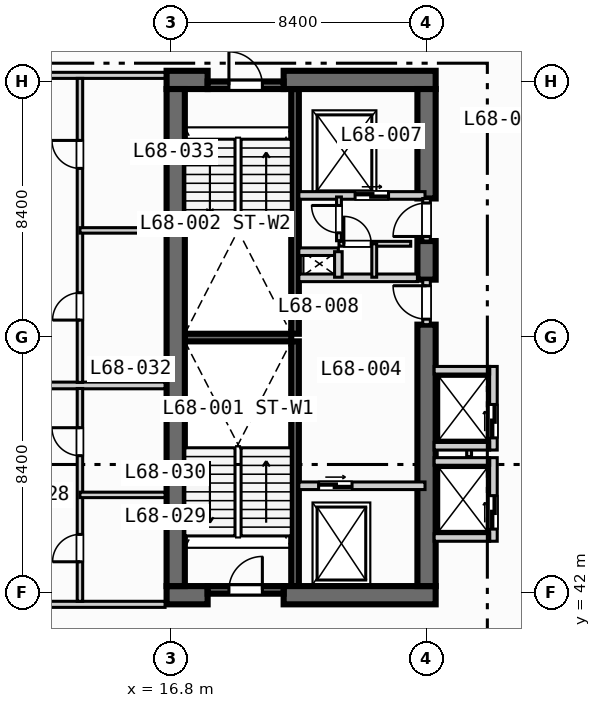
"""IFC4 building model, lengths in metres.
Left out: names, types, materials, properties, quantities, classifications, styles, units other than length and angle.
Written with IfcOpenShell. Run it as: python <this file> out.ifc"""

import sys

from ifc_helpers import new_model, si_unit, direction, frame, frame_2d, origin, place, context, subcontext, project, spatial, rectangle, extrude, element, fill, save


model = new_model("IFC4")
c1 = context("Model", 3, precision=1e-05, world=origin(), true_north=direction((0.0, 1.0)))
c2 = subcontext(c1, "Body", "Model", "MODEL_VIEW")
j1 = project(units=[si_unit("LENGTHUNIT", "METRE"), si_unit("PLANEANGLEUNIT", "RADIAN")], contexts=[c1])
p1 = place(None, origin())
s1 = spatial("IfcSite", under=j1, at=p1, CompositionType="ELEMENT")
p2 = place(p1, origin())
s2 = spatial("IfcBuilding", under=s1, at=p2, CompositionType="ELEMENT")
p3 = place(p2, frame((0.0, 0.0, 274.9)))
s3 = spatial("IfcBuildingStorey", under=s2, at=p3, CompositionType="ELEMENT", Elevation=274.9)
for number, where, z_axis, x_axis in (
    (1, (20.875, 42.2, 0.0), (0.0, 0.0, 1.0), (0.0, 1.0, 0.0)),
    (2, (20.875, 50.5, 0.0), (0.0, 0.0, 1.0), (0.0, 1.0, 0.0)),
):
    element("IfcWall", number, at=place(p3, frame(where, z_axis=z_axis, x_axis=x_axis)), inside=s3, PredefinedType="SOLIDWALL", context=c2, shape_type="SweptSolid", body=[
        extrude(rectangle(XDim=8.05, YDim=0.25, at=frame_2d((4.025, 0.0))), origin(), (0.0, 0.0, 1.0), 3.47),
    ])
p4 = place(p3, frame((17.25, 50.375, 0.0), z_axis=(0.0, 0.0, 1.0), x_axis=(1.0, 0.0, 0.0)))
e3 = element("IfcWall", 3, at=p4, inside=s3, PredefinedType="SOLIDWALL", context=c2, shape_type="SweptSolid", body=[
    extrude(rectangle(XDim=3.5, YDim=0.25, at=frame_2d((1.75, 0.0))), origin(), (0.0, 0.0, 1.0), 3.47),
])
p5 = place(p3, frame((16.65, 41.9, 0.0), z_axis=(0.0, 0.0, 1.0), x_axis=(1.0, 0.0, 0.0)))
e4 = element("IfcWall", 4, at=p5, inside=s3, PredefinedType="SHEAR", context=c2, shape_type="SweptSolid", body=[
    extrude(rectangle(XDim=1.35, YDim=0.6, at=frame_2d((0.675, 0.0))), origin(), (0.0, 0.0, 1.0), 3.47),
])
p6 = place(p3, frame((20.5, 41.9, 0.0), z_axis=(0.0, 0.0, 1.0), x_axis=(1.0, 0.0, 0.0)))
e5 = element("IfcWall", 5, at=p6, inside=s3, PredefinedType="SHEAR", context=c2, shape_type="SweptSolid", body=[
    extrude(rectangle(XDim=5.0, YDim=0.6, at=frame_2d((2.5, 0.0))), origin(), (0.0, 0.0, 1.0), 3.47),
])
p7 = place(p3, frame((16.65, 58.85, 0.0), z_axis=(0.0, 0.0, 1.0), x_axis=(1.0, 0.0, 0.0)))
e6 = element("IfcWall", 6, at=p7, inside=s3, PredefinedType="SHEAR", context=c2, shape_type="SweptSolid", body=[
    extrude(rectangle(XDim=1.35, YDim=0.6, at=frame_2d((0.675, 0.0))), origin(), (0.0, 0.0, 1.0), 3.47),
])
p8 = place(p3, frame((20.5, 58.85, 0.0), z_axis=(0.0, 0.0, 1.0), x_axis=(1.0, 0.0, 0.0)))
e7 = element("IfcWall", 7, at=p8, inside=s3, PredefinedType="SHEAR", context=c2, shape_type="SweptSolid", body=[
    extrude(rectangle(XDim=5.0, YDim=0.6, at=frame_2d((2.5, 0.0))), origin(), (0.0, 0.0, 1.0), 3.47),
])
p9 = place(p3, frame((16.95, 42.2, 0.0), z_axis=(0.0, 0.0, 1.0), x_axis=(0.0, 1.0, 0.0)))
e8 = element("IfcWall", 8, at=p9, inside=s3, PredefinedType="SHEAR", context=c2, shape_type="SweptSolid", body=[
    extrude(rectangle(XDim=16.35, YDim=0.6, at=frame_2d((8.175, 0.0))), origin(), (0.0, 0.0, 1.0), 3.47),
])
p10 = place(p3, frame((25.2, 42.2, 0.0), z_axis=(0.0, 0.0, 1.0), x_axis=(0.0, 1.0, 0.0)))
e9 = element("IfcWall", 9, at=p10, inside=s3, PredefinedType="SHEAR", context=c2, shape_type="SweptSolid", body=[
    extrude(rectangle(XDim=8.6, YDim=0.6, at=frame_2d((4.3, 0.0))), origin(), (0.0, 0.0, 1.0), 3.47),
])
p11 = place(p3, frame((25.2, 52.28, 0.0), z_axis=(0.0, 0.0, 1.0), x_axis=(0.0, 1.0, 0.0)))
e10 = element("IfcWall", 10, at=p11, inside=s3, PredefinedType="SHEAR", context=c2, shape_type="SweptSolid", body=[
    extrude(rectangle(XDim=1.27, YDim=0.6, at=frame_2d((0.635, 0.0))), origin(), (0.0, 0.0, 1.0), 3.47),
])
p12 = place(p3, frame((25.2, 54.95, 0.0), z_axis=(0.0, 0.0, 1.0), x_axis=(0.0, 1.0, 0.0)))
e11 = element("IfcWall", 11, at=p12, inside=s3, PredefinedType="SHEAR", context=c2, shape_type="SweptSolid", body=[
    extrude(rectangle(XDim=3.6, YDim=0.6, at=frame_2d((1.8, 0.0))), origin(), (0.0, 0.0, 1.0), 3.47),
])
p13 = place(p3, frame((18.0, 42.075, 0.0), z_axis=(0.0, 0.0, 1.0), x_axis=(1.0, 0.0, 0.0)))
e12 = element("IfcWall", 12, at=p13, inside=s3, PredefinedType="SOLIDWALL", context=c2, shape_type="SweptSolid", body=[
    extrude(rectangle(XDim=2.5, YDim=0.25, at=frame_2d((1.25, 0.0))), origin(), (0.0, 0.0, 1.0), 3.47),
])
p14 = place(p13, frame((0.7, 0.0, 0.0)))
e13 = element("IfcOpeningElement", 13, at=p14, cuts=e12, PredefinedType="OPENING", context=c2, shape_type="SweptSolid", body=[
    extrude(rectangle(XDim=1.1, YDim=2.15, at=frame_2d((0.55, 1.075))), frame((0.0, 0.135, 0.0), z_axis=(0.0, -1.0, 0.0), x_axis=(1.0, 0.0, 0.0)), (0.0, 0.0, 1.0), 0.27),
])
p15 = place(p3, frame((18.0, 58.675, 0.0), z_axis=(0.0, 0.0, 1.0), x_axis=(1.0, 0.0, 0.0)))
e14 = element("IfcWall", 14, at=p15, inside=s3, PredefinedType="SOLIDWALL", context=c2, shape_type="SweptSolid", body=[
    extrude(rectangle(XDim=2.5, YDim=0.25, at=frame_2d((1.25, 0.0))), origin(), (0.0, 0.0, 1.0), 3.47),
])
p16 = place(p15, frame((0.7, 0.0, 0.0)))
e15 = element("IfcOpeningElement", 15, at=p16, cuts=e14, PredefinedType="OPENING", context=c2, shape_type="SweptSolid", body=[
    extrude(rectangle(XDim=1.1, YDim=2.15, at=frame_2d((0.55, 1.075))), frame((0.0, 0.135, 0.0), z_axis=(0.0, -1.0, 0.0), x_axis=(1.0, 0.0, 0.0)), (0.0, 0.0, 1.0), 0.27),
])
p17 = place(p3, frame((21.0, 45.5, 0.0), z_axis=(0.0, 0.0, 1.0), x_axis=(1.0, 0.0, 0.0)))
e16 = element("IfcWall", 16, at=p17, inside=s3, PredefinedType="SOLIDWALL", context=c2, shape_type="SweptSolid", body=[
    extrude(rectangle(XDim=4.15, YDim=0.25, at=frame_2d((2.075, 0.0))), origin(), (0.0, 0.0, 1.0), 3.47),
])
p18 = place(p17, frame((0.65, 0.0, 0.0)))
e17 = element("IfcOpeningElement", 17, at=p18, cuts=e16, PredefinedType="OPENING", context=c2, shape_type="SweptSolid", body=[
    extrude(rectangle(XDim=1.1, YDim=2.15, at=frame_2d((0.55, 1.075))), frame((0.0, 0.135, 0.0), z_axis=(0.0, -1.0, 0.0), x_axis=(1.0, 0.0, 0.0)), (0.0, 0.0, 1.0), 0.27),
])
p19 = place(p3, frame((25.2, 50.8, 0.0), z_axis=(0.0, 0.0, 1.0), x_axis=(0.0, 1.0, 0.0)))
e18 = element("IfcWall", 18, at=p19, inside=s3, PredefinedType="SOLIDWALL", context=c2, shape_type="SweptSolid", body=[
    extrude(rectangle(XDim=1.48, YDim=0.25, at=frame_2d((0.74, 0.0))), origin(), (0.0, 0.0, 1.0), 3.47),
])
p20 = place(p19, frame((0.18, 0.0, 0.0)))
e19 = element("IfcOpeningElement", 19, at=p20, cuts=e18, PredefinedType="OPENING", context=c2, shape_type="SweptSolid", body=[
    extrude(rectangle(XDim=1.1, YDim=2.15, at=frame_2d((0.55, 1.075))), frame((0.0, 0.135, 0.0), z_axis=(0.0, -1.0, 0.0), x_axis=(1.0, 0.0, 0.0)), (0.0, 0.0, 1.0), 0.27),
])
p21 = place(p3, frame((21.0, 52.34, 0.0), z_axis=(0.0, 0.0, 1.0), x_axis=(1.0, 0.0, 0.0)))
e20 = element("IfcWall", 20, at=p21, inside=s3, PredefinedType="SOLIDWALL", context=c2, shape_type="SweptSolid", body=[
    extrude(rectangle(XDim=3.9, YDim=0.25, at=frame_2d((1.95, 0.0))), origin(), (0.0, 0.0, 1.0), 3.47),
])
p22 = place(p3, frame((21.0, 55.05, 0.0), z_axis=(0.0, 0.0, 1.0), x_axis=(1.0, 0.0, 0.0)))
e21 = element("IfcWall", 21, at=p22, inside=s3, PredefinedType="SOLIDWALL", context=c2, shape_type="SweptSolid", body=[
    extrude(rectangle(XDim=4.15, YDim=0.25, at=frame_2d((2.075, 0.0))), origin(), (0.0, 0.0, 1.0), 3.47),
])
p23 = place(p22, frame((1.85, 0.0, 0.0)))
e22 = element("IfcOpeningElement", 22, at=p23, cuts=e21, PredefinedType="OPENING", context=c2, shape_type="SweptSolid", body=[
    extrude(rectangle(XDim=1.1, YDim=2.15, at=frame_2d((0.55, 1.075))), frame((0.0, 0.135, 0.0), z_axis=(0.0, -1.0, 0.0), x_axis=(1.0, 0.0, 0.0)), (0.0, 0.0, 1.0), 0.27),
])
p24 = place(p3, frame((25.2, 53.55, 0.0), z_axis=(0.0, 0.0, 1.0), x_axis=(0.0, 1.0, 0.0)))
e23 = element("IfcWall", 23, at=p24, inside=s3, PredefinedType="SOLIDWALL", context=c2, shape_type="SweptSolid", body=[
    extrude(rectangle(XDim=1.4, YDim=0.25, at=frame_2d((0.7, 0.0))), origin(), (0.0, 0.0, 1.0), 3.47),
])
p25 = place(p24, frame((0.15, 0.0, 0.0)))
e24 = element("IfcOpeningElement", 24, at=p25, cuts=e23, PredefinedType="OPENING", context=c2, shape_type="SweptSolid", body=[
    extrude(rectangle(XDim=1.1, YDim=2.15, at=frame_2d((0.55, 1.075))), frame((0.0, 0.135, 0.0), z_axis=(0.0, -1.0, 0.0), x_axis=(1.0, 0.0, 0.0)), (0.0, 0.0, 1.0), 0.27),
])
p26 = place(p3, frame((21.0, 53.2, 0.0), z_axis=(0.0, 0.0, 1.0), x_axis=(1.0, 0.0, 0.0)))
e25 = element("IfcWall", 25, at=p26, inside=s3, PredefinedType="SOLIDWALL", context=c2, shape_type="SweptSolid", body=[
    extrude(rectangle(XDim=1.3, YDim=0.25, at=frame_2d((0.65, 0.0))), origin(), (0.0, 0.0, 1.0), 3.47),
])
p27 = place(p3, frame((22.3, 52.36, 0.0), z_axis=(0.0, 0.0, 1.0), x_axis=(0.0, 1.0, 0.0)))
e26 = element("IfcWall", 26, at=p27, inside=s3, PredefinedType="SOLIDWALL", context=c2, shape_type="SweptSolid", body=[
    extrude(rectangle(XDim=0.84, YDim=0.25, at=frame_2d((0.42, 0.0))), origin(), (0.0, 0.0, 1.0), 3.47),
])
p28 = place(p3, frame((22.32, 53.56, 0.0), z_axis=(0.0, 0.0, 1.0), x_axis=(0.0, 1.0, 0.0)))
e27 = element("IfcWall", 27, at=p28, inside=s3, PredefinedType="PARTITIONING", context=c2, shape_type="SweptSolid", body=[
    extrude(rectangle(XDim=1.44, YDim=0.16, at=frame_2d((0.72, 0.0))), origin(), (0.0, 0.0, 1.0), 3.47),
])
p29 = place(p28, frame((0.26, 0.0, 0.0)))
e28 = element("IfcOpeningElement", 28, at=p29, cuts=e27, PredefinedType="OPENING", context=c2, shape_type="SweptSolid", body=[
    extrude(rectangle(XDim=0.9, YDim=2.1, at=frame_2d((0.45, 1.05))), frame((0.0, 0.09, 0.0), z_axis=(0.0, -1.0, 0.0), x_axis=(1.0, 0.0, 0.0)), (0.0, 0.0, 1.0), 0.18),
])
p30 = place(p3, frame((22.32, 53.46, 0.0), z_axis=(0.0, 0.0, 1.0), x_axis=(1.0, 0.0, 0.0)))
e29 = element("IfcWall", 29, at=p30, inside=s3, PredefinedType="PARTITIONING", context=c2, shape_type="SweptSolid", body=[
    extrude(rectangle(XDim=2.36, YDim=0.16, at=frame_2d((1.18, 0.0))), origin(), (0.0, 0.0, 1.0), 3.47),
])
p31 = place(p30, frame((0.16, 0.0, 0.0)))
e30 = element("IfcOpeningElement", 30, at=p31, cuts=e29, PredefinedType="OPENING", context=c2, shape_type="SweptSolid", body=[
    extrude(rectangle(XDim=0.9, YDim=2.1, at=frame_2d((0.45, 1.05))), frame((0.0, 0.09, 0.0), z_axis=(0.0, -1.0, 0.0), x_axis=(1.0, 0.0, 0.0)), (0.0, 0.0, 1.0), 0.18),
])
p32 = place(p3, frame((23.48, 52.36, 0.0), z_axis=(0.0, 0.0, 1.0), x_axis=(0.0, 1.0, 0.0)))
e31 = element("IfcWall", 31, at=p32, inside=s3, PredefinedType="PARTITIONING", context=c2, shape_type="SweptSolid", body=[
    extrude(rectangle(XDim=1.1, YDim=0.16, at=frame_2d((0.55, 0.0))), origin(), (0.0, 0.0, 1.0), 3.47),
])
p33 = place(p3, frame((27.4, 43.675, 0.0), z_axis=(0.0, 0.0, 1.0), x_axis=(0.0, 1.0, 0.0)))
e32 = element("IfcWall", 32, at=p33, inside=s3, PredefinedType="SOLIDWALL", context=c2, shape_type="SweptSolid", body=[
    extrude(rectangle(XDim=2.75, YDim=0.25, at=frame_2d((1.375, 0.0))), origin(), (0.0, 0.0, 1.0), 3.47),
])
p34 = place(p33, frame((0.4, 0.0, 0.0)))
e33 = element("IfcOpeningElement", 33, at=p34, cuts=e32, PredefinedType="OPENING", context=c2, shape_type="SweptSolid", body=[
    extrude(rectangle(XDim=1.1, YDim=2.15, at=frame_2d((0.55, 1.075))), frame((0.0, 0.135, 0.0), z_axis=(0.0, -1.0, 0.0), x_axis=(1.0, 0.0, 0.0)), (0.0, 0.0, 1.0), 0.27),
])
for number, where, z_axis, x_axis in (
    (34, (25.45, 43.8, 0.0), (0.0, 0.0, 1.0), (1.0, 0.0, 0.0)),
    (35, (25.45, 46.3, 0.0), (0.0, 0.0, 1.0), (1.0, 0.0, 0.0)),
):
    element("IfcWall", number, at=place(p3, frame(where, z_axis=z_axis, x_axis=x_axis)), inside=s3, PredefinedType="SOLIDWALL", context=c2, shape_type="SweptSolid", body=[
        extrude(rectangle(XDim=1.825, YDim=0.25, at=frame_2d((0.913, 0.0))), origin(), (0.0, 0.0, 1.0), 3.47),
    ])
p35 = place(p3, frame((26.6, 46.46, 0.0), z_axis=(0.0, 0.0, 1.0), x_axis=(0.0, 1.0, 0.0)))
e36 = element("IfcWall", 36, at=p35, inside=s3, PredefinedType="PARTITIONING", context=c2, shape_type="SweptSolid", body=[
    extrude(rectangle(XDim=0.88, YDim=0.16, at=frame_2d((0.44, 0.0))), origin(), (0.0, 0.0, 1.0), 3.47),
])
p36 = place(p3, frame((27.4, 46.675, 0.0), z_axis=(0.0, 0.0, 1.0), x_axis=(0.0, 1.0, 0.0)))
e37 = element("IfcWall", 37, at=p36, inside=s3, PredefinedType="SOLIDWALL", context=c2, shape_type="SweptSolid", body=[
    extrude(rectangle(XDim=2.75, YDim=0.25, at=frame_2d((1.375, 0.0))), origin(), (0.0, 0.0, 1.0), 3.47),
])
p37 = place(p36, frame((0.4, 0.0, 0.0)))
e38 = element("IfcOpeningElement", 38, at=p37, cuts=e37, PredefinedType="OPENING", context=c2, shape_type="SweptSolid", body=[
    extrude(rectangle(XDim=1.1, YDim=2.15, at=frame_2d((0.55, 1.075))), frame((0.0, 0.135, 0.0), z_axis=(0.0, -1.0, 0.0), x_axis=(1.0, 0.0, 0.0)), (0.0, 0.0, 1.0), 0.27),
])
for number, where, z_axis, x_axis in (
    (39, (25.45, 46.8, 0.0), (0.0, 0.0, 1.0), (1.0, 0.0, 0.0)),
    (40, (25.45, 49.3, 0.0), (0.0, 0.0, 1.0), (1.0, 0.0, 0.0)),
):
    element("IfcWall", number, at=place(p3, frame(where, z_axis=z_axis, x_axis=x_axis)), inside=s3, PredefinedType="SOLIDWALL", context=c2, shape_type="SweptSolid", body=[
        extrude(rectangle(XDim=1.825, YDim=0.25, at=frame_2d((0.913, 0.0))), origin(), (0.0, 0.0, 1.0), 3.47),
    ])
p38 = place(p3, frame((8.65, 41.6, 0.0), z_axis=(0.0, 0.0, 1.0), x_axis=(1.0, 0.0, 0.0)))
e41 = element("IfcWall", 41, at=p38, inside=s3, PredefinedType="PARTITIONING", context=c2, shape_type="SweptSolid", body=[
    extrude(rectangle(XDim=7.95, YDim=0.2, at=frame_2d((3.975, 0.0))), origin(), (0.0, 0.0, 1.0), 3.47),
])
p39 = place(p38, frame((2.0, 0.0, 0.0)))
e42 = element("IfcOpeningElement", 42, at=p39, cuts=e41, PredefinedType="OPENING", context=c2, shape_type="SweptSolid", body=[
    extrude(rectangle(XDim=1.0, YDim=2.15, at=frame_2d((0.5, 1.075))), frame((0.0, 0.11, 0.0), z_axis=(0.0, -1.0, 0.0), x_axis=(1.0, 0.0, 0.0)), (0.0, 0.0, 1.0), 0.22),
])
p40 = place(p3, frame((8.65, 59.0, 0.0), z_axis=(0.0, 0.0, 1.0), x_axis=(1.0, 0.0, 0.0)))
e43 = element("IfcWall", 43, at=p40, inside=s3, PredefinedType="PARTITIONING", context=c2, shape_type="SweptSolid", body=[
    extrude(rectangle(XDim=7.95, YDim=0.2, at=frame_2d((3.975, 0.0))), origin(), (0.0, 0.0, 1.0), 2.82),
])
p41 = place(p40, frame((2.0, 0.0, 0.0)))
e44 = element("IfcOpeningElement", 44, at=p41, cuts=e43, PredefinedType="OPENING", context=c2, shape_type="SweptSolid", body=[
    extrude(rectangle(XDim=1.0, YDim=2.15, at=frame_2d((0.5, 1.075))), frame((0.0, 0.11, 0.0), z_axis=(0.0, -1.0, 0.0), x_axis=(1.0, 0.0, 0.0)), (0.0, 0.0, 1.0), 0.22),
])
p42 = place(p3, frame((8.65, 48.8, 0.0), z_axis=(0.0, 0.0, 1.0), x_axis=(1.0, 0.0, 0.0)))
e45 = element("IfcWall", 45, at=p42, inside=s3, PredefinedType="PARTITIONING", context=c2, shape_type="SweptSolid", body=[
    extrude(rectangle(XDim=7.95, YDim=0.22, at=frame_2d((3.975, 0.0))), origin(), (0.0, 0.0, 1.0), 3.47),
])
p43 = place(p3, frame((13.8, 41.7, 0.0), z_axis=(0.0, 0.0, 1.0), x_axis=(0.0, 1.0, 0.0)))
e46 = element("IfcWall", 46, at=p43, inside=s3, PredefinedType="PLUMBINGWALL", context=c2, shape_type="SweptSolid", body=[
    extrude(rectangle(XDim=7.0, YDim=0.18, at=frame_2d((3.5, 0.0))), origin(), (0.0, 0.0, 1.0), 3.47),
])
p44 = place(p43, frame((1.3, 0.0, 0.0)))
e47 = element("IfcOpeningElement", 47, at=p44, cuts=e46, PredefinedType="OPENING", context=c2, shape_type="SweptSolid", body=[
    extrude(rectangle(XDim=0.9, YDim=2.1, at=frame_2d((0.45, 1.05))), frame((0.0, 0.1, 0.0), z_axis=(0.0, -1.0, 0.0), x_axis=(1.0, 0.0, 0.0)), (0.0, 0.0, 1.0), 0.2),
])
p45 = place(p43, frame((4.79, 0.0, 0.0)))
e48 = element("IfcOpeningElement", 48, at=p45, cuts=e46, PredefinedType="OPENING", context=c2, shape_type="SweptSolid", body=[
    extrude(rectangle(XDim=0.92, YDim=2.1, at=frame_2d((0.46, 1.05))), frame((0.0, 0.1, 0.0), z_axis=(0.0, -1.0, 0.0), x_axis=(1.0, 0.0, 0.0)), (0.0, 0.0, 1.0), 0.2),
])
p46 = place(p3, frame((13.8, 45.2, 0.0), z_axis=(0.0, 0.0, 1.0), x_axis=(1.0, 0.0, 0.0)))
e49 = element("IfcWall", 49, at=p46, inside=s3, PredefinedType="PLUMBINGWALL", context=c2, shape_type="SweptSolid", body=[
    extrude(rectangle(XDim=2.8, YDim=0.18, at=frame_2d((1.4, 0.0))), origin(), (0.0, 0.0, 1.0), 3.47),
])
p47 = place(p3, frame((13.8, 48.9, 0.0), z_axis=(0.0, 0.0, 1.0), x_axis=(0.0, 1.0, 0.0)))
e50 = element("IfcWall", 50, at=p47, inside=s3, PredefinedType="PLUMBINGWALL", context=c2, shape_type="SweptSolid", body=[
    extrude(rectangle(XDim=10.0, YDim=0.18, at=frame_2d((5.0, 0.0))), origin(), (0.0, 0.0, 1.0), 3.47),
])
p48 = place(p47, frame((2.05, 0.0, 0.0)))
e51 = element("IfcOpeningElement", 51, at=p48, cuts=e50, PredefinedType="OPENING", context=c2, shape_type="SweptSolid", body=[
    extrude(rectangle(XDim=0.9, YDim=2.1, at=frame_2d((0.45, 1.05))), frame((0.0, 0.1, 0.0), z_axis=(0.0, -1.0, 0.0), x_axis=(1.0, 0.0, 0.0)), (0.0, 0.0, 1.0), 0.2),
])
p49 = place(p47, frame((7.04, 0.0, 0.0)))
e52 = element("IfcOpeningElement", 52, at=p49, cuts=e50, PredefinedType="OPENING", context=c2, shape_type="SweptSolid", body=[
    extrude(rectangle(XDim=0.92, YDim=2.1, at=frame_2d((0.46, 1.05))), frame((0.0, 0.1, 0.0), z_axis=(0.0, -1.0, 0.0), x_axis=(1.0, 0.0, 0.0)), (0.0, 0.0, 1.0), 0.2),
])
p50 = place(p3, frame((13.8, 53.9, 0.0), z_axis=(0.0, 0.0, 1.0), x_axis=(1.0, 0.0, 0.0)))
e53 = element("IfcWall", 53, at=p50, inside=s3, PredefinedType="PLUMBINGWALL", context=c2, shape_type="SweptSolid", body=[
    extrude(rectangle(XDim=2.8, YDim=0.18, at=frame_2d((1.4, 0.0))), origin(), (0.0, 0.0, 1.0), 3.47),
])
p51 = place(p14, origin())
e54 = element("IfcDoor", 54, at=p51, inside=s3, OperationType="SINGLE_SWING_RIGHT", PredefinedType="DOOR", context=c2, shape_type="SweptSolid", body=[
    extrude(rectangle(XDim=1.1, YDim=2.15, at=frame_2d((0.55, 1.075))), frame((0.0, 0.025, 0.0), z_axis=(0.0, -1.0, 0.0), x_axis=(1.0, 0.0, 0.0)), (0.0, 0.0, 1.0), 0.05),
])
fill(e13, e54)
p52 = place(p16, origin())
e55 = element("IfcDoor", 55, at=p52, inside=s3, OperationType="SINGLE_SWING_LEFT", PredefinedType="DOOR", context=c2, shape_type="SweptSolid", body=[
    extrude(rectangle(XDim=1.1, YDim=2.15, at=frame_2d((0.55, 1.075))), frame((0.0, 0.025, 0.0), z_axis=(0.0, -1.0, 0.0), x_axis=(1.0, 0.0, 0.0)), (0.0, 0.0, 1.0), 0.05),
])
fill(e15, e55)
p53 = place(p18, origin())
e56 = element("IfcDoor", 56, at=p53, inside=s3, OperationType="SLIDING_TO_LEFT", PredefinedType="DOOR", context=c2, shape_type="SweptSolid", body=[
    extrude(rectangle(XDim=1.1, YDim=2.15, at=frame_2d((0.55, 1.075))), frame((0.0, 0.025, 0.0), z_axis=(0.0, -1.0, 0.0), x_axis=(1.0, 0.0, 0.0)), (0.0, 0.0, 1.0), 0.05),
])
fill(e17, e56)
p54 = place(p20, origin())
e57 = element("IfcDoor", 57, at=p54, inside=s3, OperationType="SINGLE_SWING_RIGHT", PredefinedType="DOOR", context=c2, shape_type="SweptSolid", body=[
    extrude(rectangle(XDim=1.1, YDim=2.15, at=frame_2d((0.55, 1.075))), frame((0.0, 0.025, 0.0), z_axis=(0.0, -1.0, 0.0), x_axis=(1.0, 0.0, 0.0)), (0.0, 0.0, 1.0), 0.05),
])
fill(e19, e57)
p55 = place(p23, origin())
e58 = element("IfcDoor", 58, at=p55, inside=s3, OperationType="SLIDING_TO_LEFT", PredefinedType="DOOR", context=c2, shape_type="SweptSolid", body=[
    extrude(rectangle(XDim=1.1, YDim=2.15, at=frame_2d((0.55, 1.075))), frame((0.0, 0.025, 0.0), z_axis=(0.0, -1.0, 0.0), x_axis=(1.0, 0.0, 0.0)), (0.0, 0.0, 1.0), 0.05),
])
fill(e22, e58)
p56 = place(p25, origin())
e59 = element("IfcDoor", 59, at=p56, inside=s3, OperationType="SINGLE_SWING_LEFT", PredefinedType="DOOR", context=c2, shape_type="SweptSolid", body=[
    extrude(rectangle(XDim=1.1, YDim=2.15, at=frame_2d((0.55, 1.075))), frame((0.0, 0.025, 0.0), z_axis=(0.0, -1.0, 0.0), x_axis=(1.0, 0.0, 0.0)), (0.0, 0.0, 1.0), 0.05),
])
fill(e24, e59)
p57 = place(p29, origin())
e60 = element("IfcDoor", 60, at=p57, inside=s3, OperationType="SINGLE_SWING_RIGHT", PredefinedType="DOOR", context=c2, shape_type="SweptSolid", body=[
    extrude(rectangle(XDim=0.9, YDim=2.1, at=frame_2d((0.45, 1.05))), frame((0.0, 0.025, 0.0), z_axis=(0.0, -1.0, 0.0), x_axis=(1.0, 0.0, 0.0)), (0.0, 0.0, 1.0), 0.05),
])
fill(e28, e60)
p58 = place(p31, origin())
e61 = element("IfcDoor", 61, at=p58, inside=s3, OperationType="SINGLE_SWING_LEFT", PredefinedType="DOOR", context=c2, shape_type="SweptSolid", body=[
    extrude(rectangle(XDim=0.9, YDim=2.1, at=frame_2d((0.45, 1.05))), frame((0.0, 0.025, 0.0), z_axis=(0.0, -1.0, 0.0), x_axis=(1.0, 0.0, 0.0)), (0.0, 0.0, 1.0), 0.05),
])
fill(e30, e61)
p59 = place(p34, origin())
e62 = element("IfcDoor", 62, at=p59, inside=s3, OperationType="SLIDING_TO_LEFT", PredefinedType="DOOR", context=c2, shape_type="SweptSolid", body=[
    extrude(rectangle(XDim=1.1, YDim=2.15, at=frame_2d((0.55, 1.075))), frame((0.0, 0.025, 0.0), z_axis=(0.0, -1.0, 0.0), x_axis=(1.0, 0.0, 0.0)), (0.0, 0.0, 1.0), 0.05),
])
fill(e33, e62)
p60 = place(p37, origin())
e63 = element("IfcDoor", 63, at=p60, inside=s3, OperationType="SLIDING_TO_LEFT", PredefinedType="DOOR", context=c2, shape_type="SweptSolid", body=[
    extrude(rectangle(XDim=1.1, YDim=2.15, at=frame_2d((0.55, 1.075))), frame((0.0, 0.025, 0.0), z_axis=(0.0, -1.0, 0.0), x_axis=(1.0, 0.0, 0.0)), (0.0, 0.0, 1.0), 0.05),
])
fill(e38, e63)
p61 = place(p44, origin())
e64 = element("IfcDoor", 64, at=p61, inside=s3, OperationType="SINGLE_SWING_LEFT", PredefinedType="DOOR", context=c2, shape_type="SweptSolid", body=[
    extrude(rectangle(XDim=0.9, YDim=2.1, at=frame_2d((0.45, 1.05))), frame((0.0, 0.025, 0.0), z_axis=(0.0, -1.0, 0.0), x_axis=(1.0, 0.0, 0.0)), (0.0, 0.0, 1.0), 0.05),
])
fill(e47, e64)
p62 = place(p45, origin())
e65 = element("IfcDoor", 65, at=p62, inside=s3, OperationType="SINGLE_SWING_RIGHT", PredefinedType="DOOR", context=c2, shape_type="SweptSolid", body=[
    extrude(rectangle(XDim=0.92, YDim=2.1, at=frame_2d((0.46, 1.05))), frame((0.0, 0.025, 0.0), z_axis=(0.0, -1.0, 0.0), x_axis=(1.0, 0.0, 0.0)), (0.0, 0.0, 1.0), 0.05),
])
fill(e48, e65)
p63 = place(p48, origin())
e66 = element("IfcDoor", 66, at=p63, inside=s3, OperationType="SINGLE_SWING_LEFT", PredefinedType="DOOR", context=c2, shape_type="SweptSolid", body=[
    extrude(rectangle(XDim=0.9, YDim=2.1, at=frame_2d((0.45, 1.05))), frame((0.0, 0.025, 0.0), z_axis=(0.0, -1.0, 0.0), x_axis=(1.0, 0.0, 0.0)), (0.0, 0.0, 1.0), 0.05),
])
fill(e51, e66)
p64 = place(p49, origin())
e67 = element("IfcDoor", 67, at=p64, inside=s3, OperationType="SINGLE_SWING_RIGHT", PredefinedType="DOOR", context=c2, shape_type="SweptSolid", body=[
    extrude(rectangle(XDim=0.92, YDim=2.1, at=frame_2d((0.46, 1.05))), frame((0.0, 0.025, 0.0), z_axis=(0.0, -1.0, 0.0), x_axis=(1.0, 0.0, 0.0)), (0.0, 0.0, 1.0), 0.05),
])
fill(e52, e67)
save(model, sys.argv[1])
